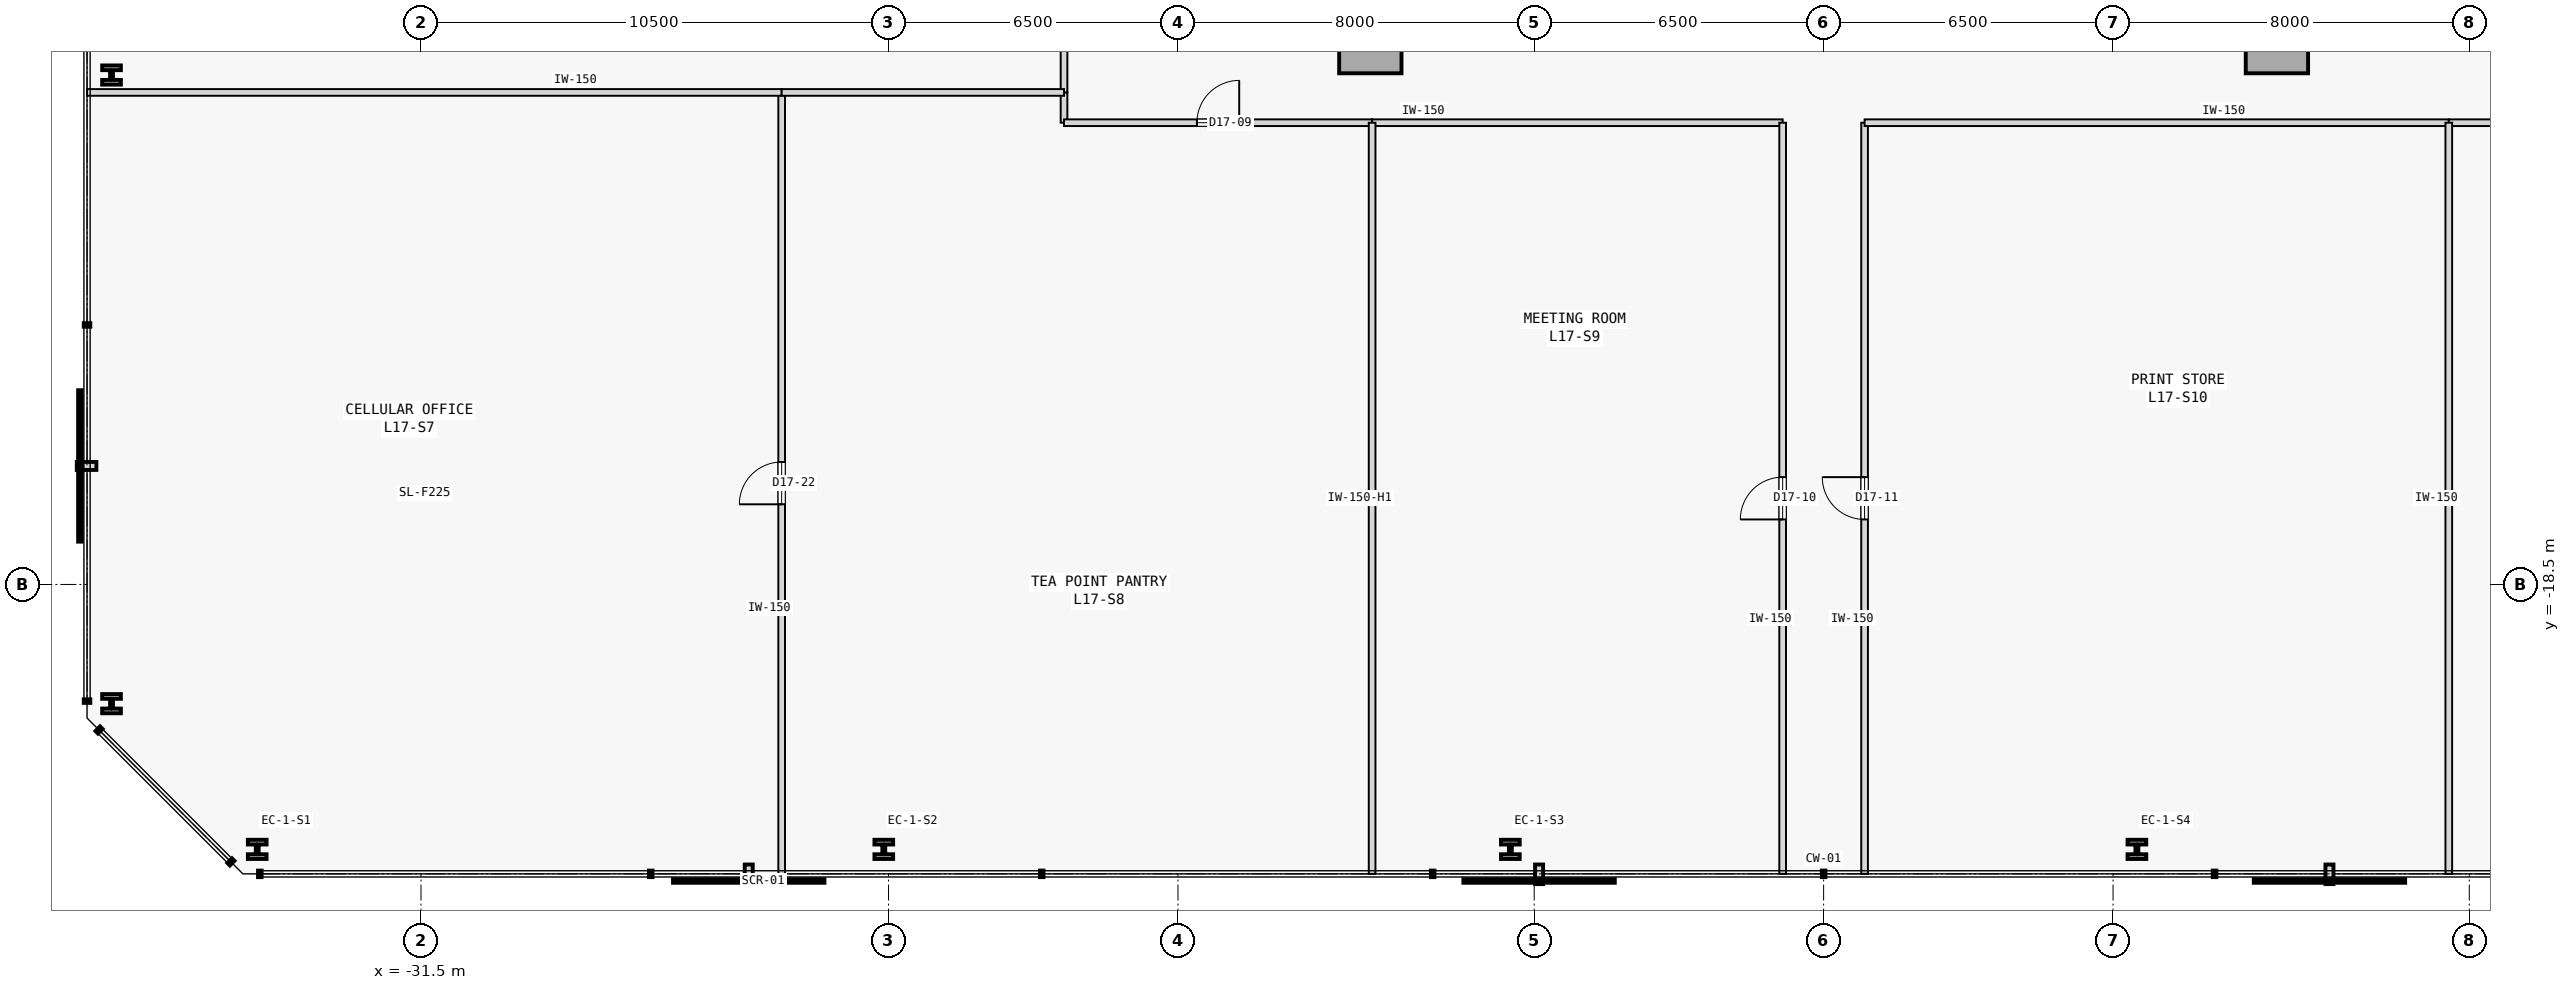
"""IFC4 building model, lengths in metres.
Left out: names, types, materials, properties, quantities, classifications, styles, units other than length and angle.
Written with IfcOpenShell. Run it as: python <this file> out.ifc"""

import sys

from ifc_helpers import new_model, si_unit, direction, frame, frame_2d, origin, origin_2d, place, context, subcontext, project, spatial, rectangle, i_section, extrude, element, fill, save


model = new_model("IFC4")
c1 = context("Model", 3, precision=1e-05, world=origin(), true_north=direction((0.0, 1.0)))
c2 = subcontext(c1, "Body", "Model", "MODEL_VIEW")
j1 = project(units=[si_unit("LENGTHUNIT", "METRE"), si_unit("PLANEANGLEUNIT", "RADIAN")], contexts=[c1])
p1 = place(None, origin())
s1 = spatial("IfcSite", under=j1, at=p1, CompositionType="ELEMENT")
p2 = place(p1, origin())
s2 = spatial("IfcBuilding", under=s1, at=p2, CompositionType="ELEMENT")
p3 = place(p2, frame((0.0, 0.0, 71.2)))
s3 = spatial("IfcBuildingStorey", under=s2, at=p3, CompositionType="ELEMENT", Elevation=71.2)
for number, where, z_axis, x_axis in (
    (1, (-10.18, -6.32, 0.0), (0.0, 0.0, 1.0), (1.0, 0.0, 0.0)),
    (2, (10.18, -6.32, 0.0), (0.0, 0.0, 1.0), (1.0, 0.0, 0.0)),
):
    element("IfcColumn", number, at=place(p3, frame(where, z_axis=z_axis, x_axis=x_axis)), inside=s3, PredefinedType="COLUMN", context=c2, shape_type="SweptSolid", body=[
        extrude(rectangle(XDim=1.4, YDim=1.4, at=origin_2d()), origin(), (0.0, 0.0, 1.0), 3.8),
    ])
for number, where, z_axis, x_axis in (
    (3, (-35.178, -24.45, 0.0), (0.0, 0.0, 1.0), (1.0, 0.0, 0.0)),
    (4, (-21.107, -24.45, 0.0), (0.0, 0.0, 1.0), (1.0, 0.0, 0.0)),
    (5, (-7.036, -24.45, 0.0), (0.0, 0.0, 1.0), (1.0, 0.0, 0.0)),
    (6, (7.036, -24.45, 0.0), (0.0, 0.0, 1.0), (1.0, 0.0, 0.0)),
    (7, (-38.45, -7.059, 0.0), (0.0, 0.0, 1.0), (1.0, 0.0, 0.0)),
    (8, (-38.45, -21.178, 0.0), (0.0, 0.0, 1.0), (1.0, 0.0, 0.0)),
):
    element("IfcColumn", number, at=place(p3, frame(where, z_axis=z_axis, x_axis=x_axis)), inside=s3, PredefinedType="COLUMN", context=c2, shape_type="SweptSolid", body=[
        extrude(i_section(OverallWidth=0.42, OverallDepth=0.431, WebThickness=0.065, FlangeThickness=0.106, FilletRadius=0.015, at=origin_2d()), origin(), (0.0, 0.0, 1.0), 3.8),
    ])
p4 = place(p3, frame((-17.059, -8.13, 0.0), z_axis=(0.0, 0.0, 1.0), x_axis=(0.0, 1.0, 0.0)))
e9 = element("IfcWall", 9, at=p4, inside=s3, PredefinedType="PARTITIONING", context=c2, shape_type="SweptSolid", body=[
    extrude(rectangle(XDim=0.68, YDim=0.15, at=frame_2d((0.34, 0.0))), origin(), (0.0, 0.0, 1.0), 3.575),
])
p5 = place(p3, frame((-17.059, -8.13, 0.0), z_axis=(0.0, 0.0, 1.0), x_axis=(1.0, 0.0, 0.0)))
e10 = element("IfcWall", 10, at=p5, inside=s3, PredefinedType="PARTITIONING", context=c2, shape_type="SweptSolid", body=[
    extrude(rectangle(XDim=6.919, YDim=0.15, at=frame_2d((3.459, 0.0))), origin(), (0.0, 0.0, 1.0), 3.575),
])
p6 = place(p5, frame((2.985, 0.0, 0.0)))
e11 = element("IfcOpeningElement", 11, at=p6, cuts=e10, PredefinedType="OPENING", context=c2, shape_type="SweptSolid", body=[
    extrude(rectangle(XDim=0.95, YDim=2.15, at=frame_2d((0.475, 1.075))), frame((0.0, 0.085, 0.0), z_axis=(0.0, -1.0, 0.0), x_axis=(1.0, 0.0, 0.0)), (0.0, 0.0, 1.0), 0.17),
])
p7 = place(p3, frame((-10.14, -8.13, 0.0), z_axis=(0.0, 0.0, 1.0), x_axis=(1.0, 0.0, 0.0)))
e12 = element("IfcWall", 12, at=p7, inside=s3, PredefinedType="PARTITIONING", context=c2, shape_type="SweptSolid", body=[
    extrude(rectangle(XDim=9.22, YDim=0.15, at=frame_2d((4.61, 0.0))), origin(), (0.0, 0.0, 1.0), 3.575),
])
p8 = place(p3, frame((-0.92, -25.0, 0.0), z_axis=(0.0, 0.0, 1.0), x_axis=(0.0, 1.0, 0.0)))
e13 = element("IfcWall", 13, at=p8, inside=s3, PredefinedType="PARTITIONING", context=c2, shape_type="SweptSolid", body=[
    extrude(rectangle(XDim=16.87, YDim=0.15, at=frame_2d((8.435, 0.0))), origin(), (0.0, 0.0, 1.0), 3.575),
])
p9 = place(p8, frame((7.96, 0.0, 0.0)))
e14 = element("IfcOpeningElement", 14, at=p9, cuts=e13, PredefinedType="OPENING", context=c2, shape_type="SweptSolid", body=[
    extrude(rectangle(XDim=0.95, YDim=2.15, at=frame_2d((0.475, 1.075))), frame((0.0, 0.085, 0.0), z_axis=(0.0, -1.0, 0.0), x_axis=(1.0, 0.0, 0.0)), (0.0, 0.0, 1.0), 0.17),
])
p10 = place(p3, frame((0.92, -25.0, 0.0), z_axis=(0.0, 0.0, 1.0), x_axis=(0.0, 1.0, 0.0)))
e15 = element("IfcWall", 15, at=p10, inside=s3, PredefinedType="PARTITIONING", context=c2, shape_type="SweptSolid", body=[
    extrude(rectangle(XDim=16.87, YDim=0.15, at=frame_2d((8.435, 0.0))), origin(), (0.0, 0.0, 1.0), 3.575),
])
p11 = place(p10, frame((7.96, 0.0, 0.0)))
e16 = element("IfcOpeningElement", 16, at=p11, cuts=e15, PredefinedType="OPENING", context=c2, shape_type="SweptSolid", body=[
    extrude(rectangle(XDim=0.95, YDim=2.15, at=frame_2d((0.475, 1.075))), frame((0.0, 0.085, 0.0), z_axis=(0.0, -1.0, 0.0), x_axis=(1.0, 0.0, 0.0)), (0.0, 0.0, 1.0), 0.17),
])
p12 = place(p3, frame((0.92, -8.13, 0.0), z_axis=(0.0, 0.0, 1.0), x_axis=(1.0, 0.0, 0.0)))
e17 = element("IfcWall", 17, at=p12, inside=s3, PredefinedType="PARTITIONING", context=c2, shape_type="SweptSolid", body=[
    extrude(rectangle(XDim=13.12, YDim=0.15, at=frame_2d((6.56, 0.0))), origin(), (0.0, 0.0, 1.0), 3.575),
])
p13 = place(p3, frame((14.04, -8.13, 0.0), z_axis=(0.0, 0.0, 1.0), x_axis=(1.0, 0.0, 0.0)))
e18 = element("IfcWall", 18, at=p13, inside=s3, PredefinedType="PARTITIONING", context=c2, shape_type="SweptSolid", body=[
    extrude(rectangle(XDim=3.019, YDim=0.15, at=frame_2d((1.51, 0.0))), origin(), (0.0, 0.0, 1.0), 3.575),
])
p14 = place(p13, frame((1.034, 0.0, 0.0)))
e19 = element("IfcOpeningElement", 19, at=p14, cuts=e18, PredefinedType="OPENING", context=c2, shape_type="SweptSolid", body=[
    extrude(rectangle(XDim=0.95, YDim=2.15, at=frame_2d((0.475, 1.075))), frame((0.0, 0.085, 0.0), z_axis=(0.0, -1.0, 0.0), x_axis=(1.0, 0.0, 0.0)), (0.0, 0.0, 1.0), 0.17),
])
p15 = place(p3, frame((-17.059, -7.45, 0.0), z_axis=(0.0, 0.0, 1.0), x_axis=(0.0, 1.0, 0.0)))
e20 = element("IfcWall", 20, at=p15, inside=s3, PredefinedType="PARTITIONING", context=c2, shape_type="SweptSolid", body=[
    extrude(rectangle(XDim=3.129, YDim=0.15, at=frame_2d((1.564, 0.0))), origin(), (0.0, 0.0, 1.0), 3.575),
])
p16 = place(p15, frame((1.09, 0.0, 0.0)))
e21 = element("IfcOpeningElement", 21, at=p16, cuts=e20, PredefinedType="OPENING", context=c2, shape_type="SweptSolid", body=[
    extrude(rectangle(XDim=0.95, YDim=2.15, at=frame_2d((0.475, 1.075))), frame((0.0, 0.085, 0.0), z_axis=(0.0, -1.0, 0.0), x_axis=(1.0, 0.0, 0.0)), (0.0, 0.0, 1.0), 0.17),
])
p17 = place(p3, frame((-23.4, -25.0, 0.0), z_axis=(0.0, 0.0, 1.0), x_axis=(0.0, 1.0, 0.0)))
e22 = element("IfcWall", 22, at=p17, inside=s3, PredefinedType="PARTITIONING", context=c2, shape_type="SweptSolid", body=[
    extrude(rectangle(XDim=17.55, YDim=0.15, at=frame_2d((8.775, 0.0))), origin(), (0.0, 0.0, 1.0), 3.575),
])
p18 = place(p17, frame((8.3, 0.0, 0.0)))
e23 = element("IfcOpeningElement", 23, at=p18, cuts=e22, PredefinedType="OPENING", context=c2, shape_type="SweptSolid", body=[
    extrude(rectangle(XDim=0.95, YDim=2.15, at=frame_2d((0.475, 1.075))), frame((0.0, 0.085, 0.0), z_axis=(0.0, -1.0, 0.0), x_axis=(1.0, 0.0, 0.0)), (0.0, 0.0, 1.0), 0.17),
])
p19 = place(p3, frame((-39.0, -7.45, 0.0), z_axis=(0.0, 0.0, 1.0), x_axis=(1.0, 0.0, 0.0)))
e24 = element("IfcWall", 24, at=p19, inside=s3, PredefinedType="PARTITIONING", context=c2, shape_type="SweptSolid", body=[
    extrude(rectangle(XDim=15.6, YDim=0.15, at=frame_2d((7.8, 0.0))), origin(), (0.0, 0.0, 1.0), 3.575),
])
p20 = place(p3, frame((-10.14, -25.0, 0.0), z_axis=(0.0, 0.0, 1.0), x_axis=(0.0, 1.0, 0.0)))
e25 = element("IfcWall", 25, at=p20, inside=s3, PredefinedType="PARTITIONING", context=c2, shape_type="SweptSolid", body=[
    extrude(rectangle(XDim=16.87, YDim=0.15, at=frame_2d((8.435, 0.0))), origin(), (0.0, 0.0, 1.0), 3.125),
])
p21 = place(p3, frame((-23.4, -7.45, 0.0), z_axis=(0.0, 0.0, 1.0), x_axis=(1.0, 0.0, 0.0)))
e26 = element("IfcWall", 26, at=p21, inside=s3, PredefinedType="PARTITIONING", context=c2, shape_type="SweptSolid", body=[
    extrude(rectangle(XDim=6.341, YDim=0.15, at=frame_2d((3.17, 0.0))), origin(), (0.0, 0.0, 1.0), 3.575),
])
p22 = place(p3, frame((14.04, -25.0, 0.0), z_axis=(0.0, 0.0, 1.0), x_axis=(0.0, 1.0, 0.0)))
e27 = element("IfcWall", 27, at=p22, inside=s3, PredefinedType="PARTITIONING", context=c2, shape_type="SweptSolid", body=[
    extrude(rectangle(XDim=16.87, YDim=0.15, at=frame_2d((8.435, 0.0))), origin(), (0.0, 0.0, 1.0), 3.575),
])
p23 = place(p6, origin())
e28 = element("IfcDoor", 28, at=p23, inside=s3, OperationType="SINGLE_SWING_RIGHT", PredefinedType="DOOR", context=c2, shape_type="SweptSolid", body=[
    extrude(rectangle(XDim=0.95, YDim=2.15, at=frame_2d((0.475, 1.075))), frame((0.0, 0.025, 0.0), z_axis=(0.0, -1.0, 0.0), x_axis=(1.0, 0.0, 0.0)), (0.0, 0.0, 1.0), 0.05),
])
fill(e11, e28)
p24 = place(p9, origin())
e29 = element("IfcDoor", 29, at=p24, inside=s3, OperationType="SINGLE_SWING_LEFT", PredefinedType="DOOR", context=c2, shape_type="SweptSolid", body=[
    extrude(rectangle(XDim=0.95, YDim=2.15, at=frame_2d((0.475, 1.075))), frame((0.0, 0.025, 0.0), z_axis=(0.0, -1.0, 0.0), x_axis=(1.0, 0.0, 0.0)), (0.0, 0.0, 1.0), 0.05),
])
fill(e14, e29)
p25 = place(p11, origin())
e30 = element("IfcDoor", 30, at=p25, inside=s3, OperationType="SINGLE_SWING_RIGHT", PredefinedType="DOOR", context=c2, shape_type="SweptSolid", body=[
    extrude(rectangle(XDim=0.95, YDim=2.15, at=frame_2d((0.475, 1.075))), frame((0.0, 0.025, 0.0), z_axis=(0.0, -1.0, 0.0), x_axis=(1.0, 0.0, 0.0)), (0.0, 0.0, 1.0), 0.05),
])
fill(e16, e30)
p26 = place(p18, origin())
e31 = element("IfcDoor", 31, at=p26, inside=s3, OperationType="SINGLE_SWING_LEFT", PredefinedType="DOOR", context=c2, shape_type="SweptSolid", body=[
    extrude(rectangle(XDim=0.95, YDim=2.15, at=frame_2d((0.475, 1.075))), frame((0.0, 0.025, 0.0), z_axis=(0.0, -1.0, 0.0), x_axis=(1.0, 0.0, 0.0)), (0.0, 0.0, 1.0), 0.05),
])
fill(e23, e31)
save(model, sys.argv[1])
